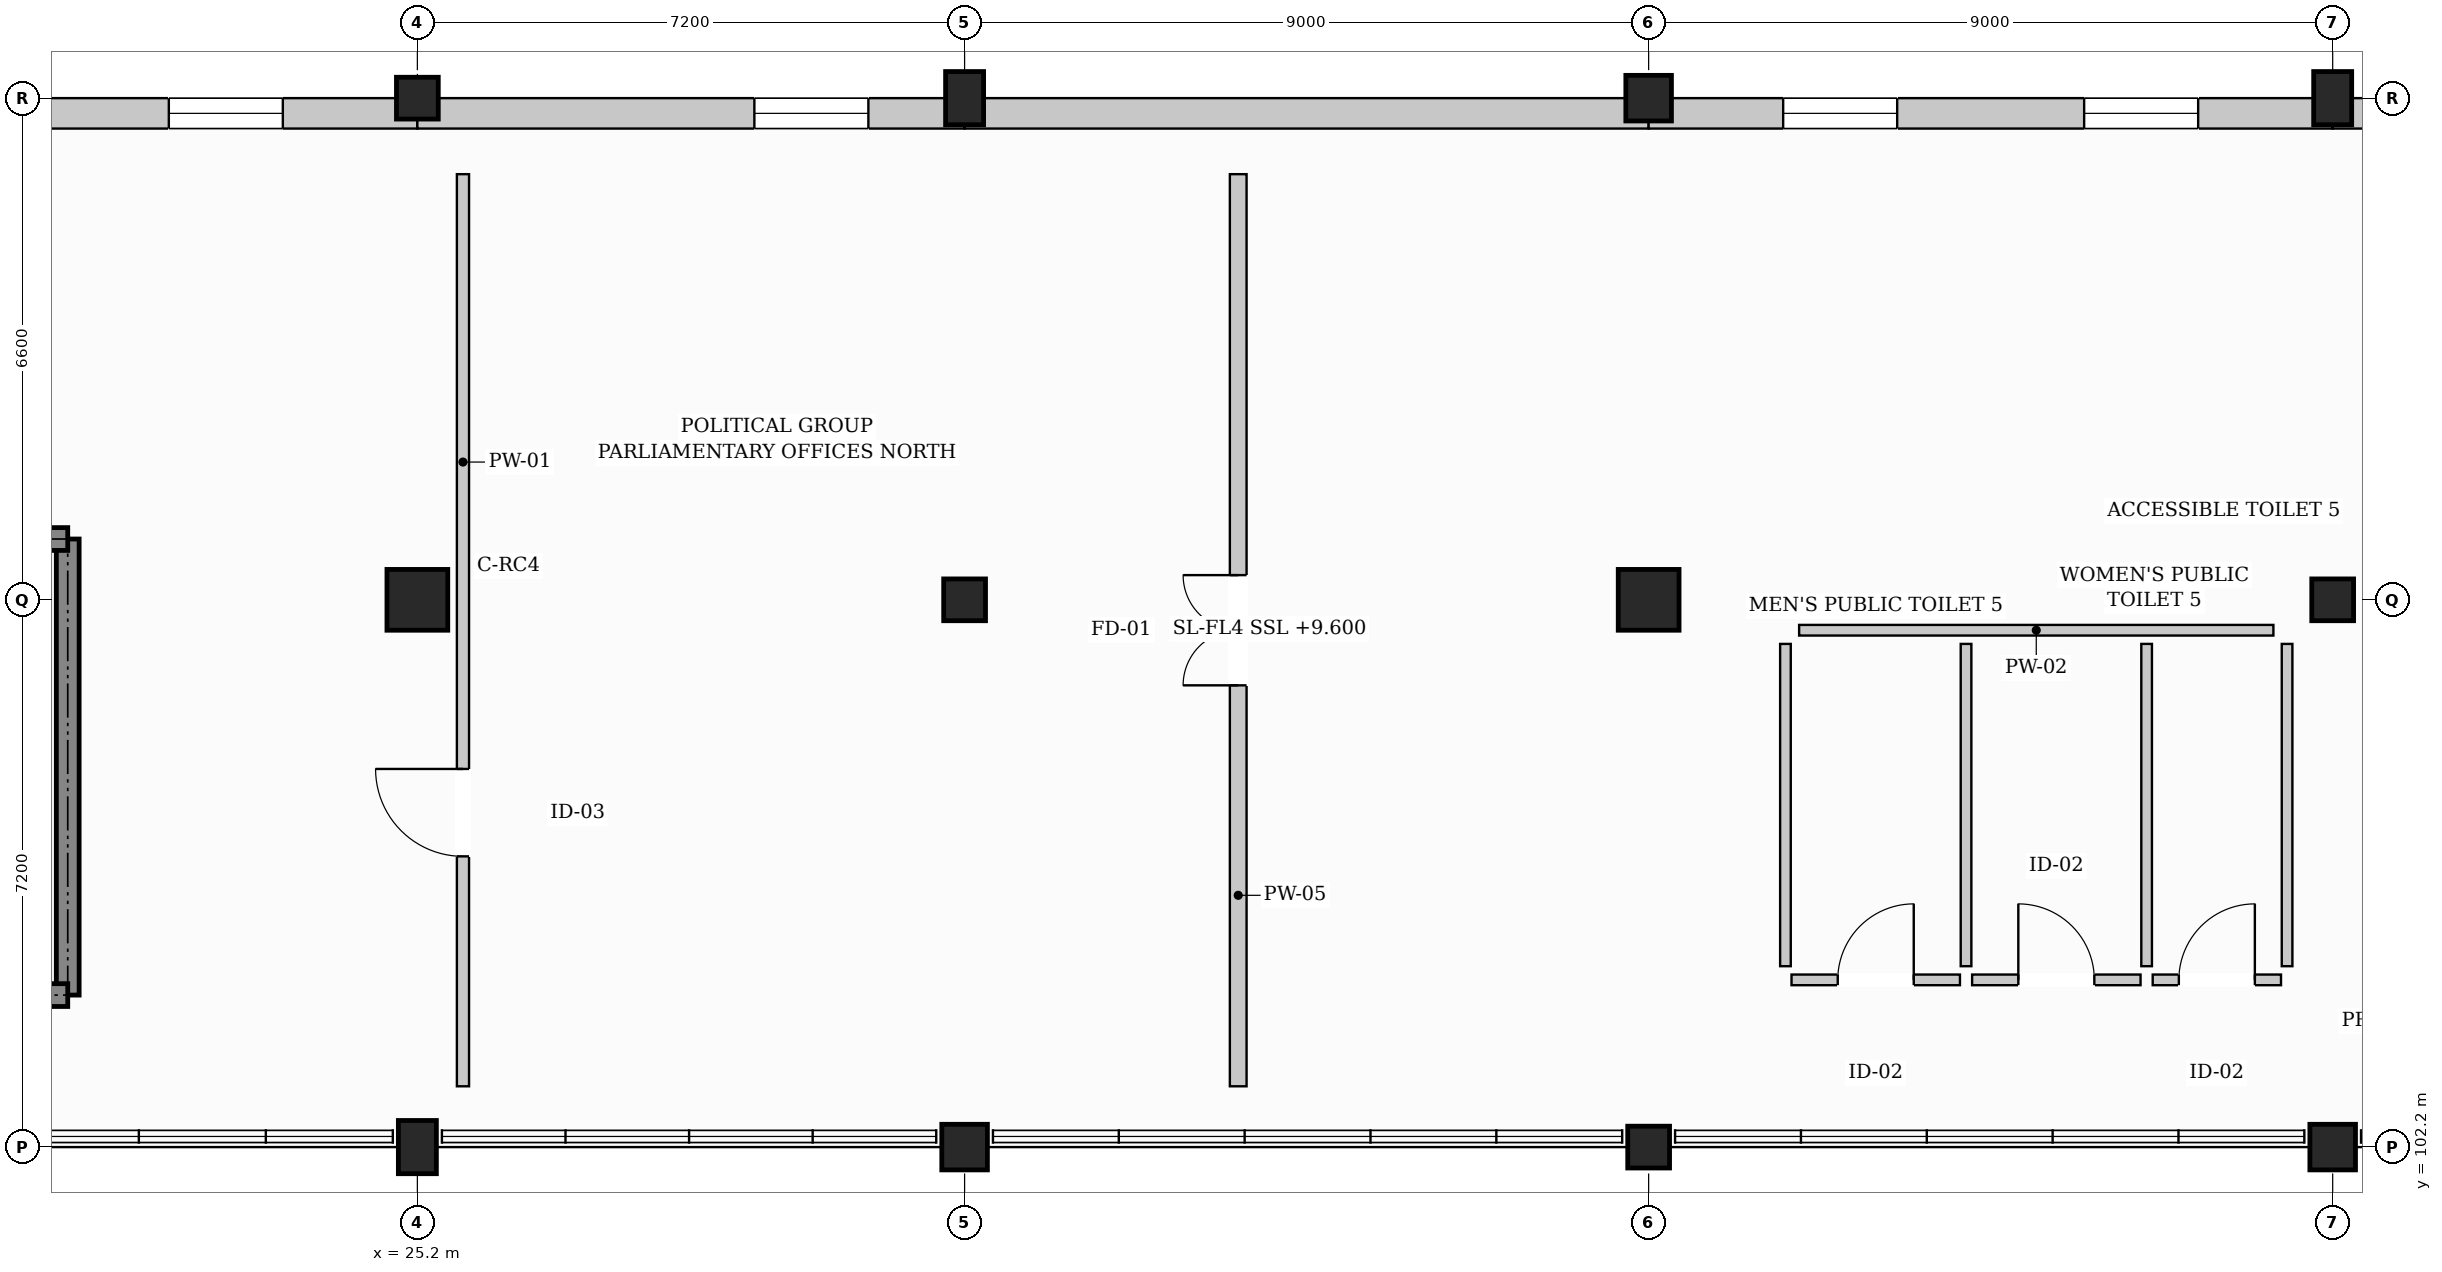
"""IFC4 building model, lengths in metres.
Left out: names, types, materials, properties, quantities, classifications, styles, units other than length and angle.
Written with IfcOpenShell. Run it as: python <this file> out.ifc"""

import sys

from ifc_helpers import new_model, si_unit, direction, frame, frame_2d, origin, origin_2d, place, context, subcontext, project, spatial, rectangle, extrude, element, fill, save


model = new_model("IFC4")
c1 = context("Model", 3, precision=1e-05, world=origin(), true_north=direction((0.0, 1.0)))
c2 = subcontext(c1, "Body", "Model", "MODEL_VIEW")
j1 = project(units=[si_unit("LENGTHUNIT", "METRE"), si_unit("PLANEANGLEUNIT", "RADIAN")], contexts=[c1])
p1 = place(None, origin())
s1 = spatial("IfcSite", under=j1, at=p1, CompositionType="ELEMENT")
p2 = place(p1, origin())
s2 = spatial("IfcBuilding", under=s1, at=p2, CompositionType="ELEMENT")
p3 = place(p2, frame((0.0, 0.0, 9.6)))
s3 = spatial("IfcBuildingStorey", under=s2, at=p3, CompositionType="ELEMENT", Elevation=9.6)
p4 = place(p3, frame((25.2, 102.2, 0.0), z_axis=(0.0, 0.0, 1.0), x_axis=(1.0, 0.0, 0.0)))
e1 = element("IfcColumn", 1, at=p4, inside=s3, PredefinedType="COLUMN", context=c2, shape_type="SweptSolid", body=[
    extrude(rectangle(XDim=0.5, YDim=0.7, at=origin_2d()), origin(), (0.0, 0.0, 1.0), 3.6),
])
p5 = place(p3, frame((25.2, 109.4, 0.0), z_axis=(0.0, 0.0, 1.0), x_axis=(1.0, 0.0, 0.0)))
e2 = element("IfcColumn", 2, at=p5, inside=s3, PredefinedType="COLUMN", context=c2, shape_type="SweptSolid", body=[
    extrude(rectangle(XDim=0.8, YDim=0.8, at=origin_2d()), origin(), (0.0, 0.0, 1.0), 3.6),
])
p6 = place(p3, frame((25.2, 116.0, 0.0), z_axis=(0.0, 0.0, 1.0), x_axis=(1.0, 0.0, 0.0)))
e3 = element("IfcColumn", 3, at=p6, inside=s3, PredefinedType="COLUMN", context=c2, shape_type="SweptSolid", body=[
    extrude(rectangle(XDim=0.55, YDim=0.55, at=origin_2d()), origin(), (0.0, 0.0, 1.0), 3.6),
])
p7 = place(p3, frame((32.4, 102.2, 0.0), z_axis=(0.0, 0.0, 1.0), x_axis=(1.0, 0.0, 0.0)))
e4 = element("IfcColumn", 4, at=p7, inside=s3, PredefinedType="COLUMN", context=c2, shape_type="SweptSolid", body=[
    extrude(rectangle(XDim=0.6, YDim=0.6, at=origin_2d()), origin(), (0.0, 0.0, 1.0), 3.6),
])
p8 = place(p3, frame((32.4, 109.4, 0.0), z_axis=(0.0, 0.0, 1.0), x_axis=(1.0, 0.0, 0.0)))
e5 = element("IfcColumn", 5, at=p8, inside=s3, PredefinedType="COLUMN", context=c2, shape_type="SweptSolid", body=[
    extrude(rectangle(XDim=0.55, YDim=0.55, at=origin_2d()), origin(), (0.0, 0.0, 1.0), 3.6),
])
p9 = place(p3, frame((32.4, 116.0, 0.0), z_axis=(0.0, 0.0, 1.0), x_axis=(1.0, 0.0, 0.0)))
e6 = element("IfcColumn", 6, at=p9, inside=s3, PredefinedType="COLUMN", context=c2, shape_type="SweptSolid", body=[
    extrude(rectangle(XDim=0.5, YDim=0.7, at=origin_2d()), origin(), (0.0, 0.0, 1.0), 3.6),
])
p10 = place(p3, frame((41.4, 102.2, 0.0), z_axis=(0.0, 0.0, 1.0), x_axis=(1.0, 0.0, 0.0)))
e7 = element("IfcColumn", 7, at=p10, inside=s3, PredefinedType="COLUMN", context=c2, shape_type="SweptSolid", body=[
    extrude(rectangle(XDim=0.55, YDim=0.55, at=origin_2d()), origin(), (0.0, 0.0, 1.0), 3.6),
])
p11 = place(p3, frame((41.4, 109.4, 0.0), z_axis=(0.0, 0.0, 1.0), x_axis=(1.0, 0.0, 0.0)))
e8 = element("IfcColumn", 8, at=p11, inside=s3, PredefinedType="COLUMN", context=c2, shape_type="SweptSolid", body=[
    extrude(rectangle(XDim=0.8, YDim=0.8, at=origin_2d()), origin(), (0.0, 0.0, 1.0), 3.6),
])
for number, where, z_axis, x_axis in (
    (9, (41.4, 116.0, 0.0), (0.0, 0.0, 1.0), (1.0, 0.0, 0.0)),
    (10, (50.4, 102.2, 0.0), (0.0, 0.0, 1.0), (1.0, 0.0, 0.0)),
):
    element("IfcColumn", number, at=place(p3, frame(where, z_axis=z_axis, x_axis=x_axis)), inside=s3, PredefinedType="COLUMN", context=c2, shape_type="SweptSolid", body=[
        extrude(rectangle(XDim=0.6, YDim=0.6, at=origin_2d()), origin(), (0.0, 0.0, 1.0), 3.6),
    ])
p12 = place(p3, frame((50.4, 109.4, 0.0), z_axis=(0.0, 0.0, 1.0), x_axis=(1.0, 0.0, 0.0)))
e11 = element("IfcColumn", 11, at=p12, inside=s3, PredefinedType="COLUMN", context=c2, shape_type="SweptSolid", body=[
    extrude(rectangle(XDim=0.55, YDim=0.55, at=origin_2d()), origin(), (0.0, 0.0, 1.0), 3.6),
])
p13 = place(p3, frame((50.4, 116.0, 0.0), z_axis=(0.0, 0.0, 1.0), x_axis=(1.0, 0.0, 0.0)))
e12 = element("IfcColumn", 12, at=p13, inside=s3, PredefinedType="COLUMN", context=c2, shape_type="SweptSolid", body=[
    extrude(rectangle(XDim=0.5, YDim=0.7, at=origin_2d()), origin(), (0.0, 0.0, 1.0), 3.6),
])
p14 = place(p3, frame((16.2, 115.8, 0.0), z_axis=(0.0, 0.0, 1.0), x_axis=(1.0, 0.0, 0.0)))
e13 = element("IfcWall", 13, at=p14, inside=s3, PredefinedType="SOLIDWALL", context=c2, shape_type="SweptSolid", body=[
    extrude(rectangle(XDim=9.0, YDim=0.4, at=frame_2d((4.5, 0.0))), origin(), (0.0, 0.0, 1.0), 2.6),
])
p15 = place(p14, frame((1.77, 0.0, 0.75)))
e14 = element("IfcOpeningElement", 14, at=p15, cuts=e13, PredefinedType="OPENING", context=c2, shape_type="SweptSolid", body=[
    extrude(rectangle(XDim=1.5, YDim=1.6, at=frame_2d((0.75, 0.8))), frame((0.0, 0.21, 0.0), z_axis=(0.0, -1.0, 0.0), x_axis=(1.0, 0.0, 0.0)), (0.0, 0.0, 1.0), 0.42),
])
p16 = place(p14, frame((5.73, 0.0, 0.75)))
e15 = element("IfcOpeningElement", 15, at=p16, cuts=e13, PredefinedType="OPENING", context=c2, shape_type="SweptSolid", body=[
    extrude(rectangle(XDim=1.5, YDim=1.6, at=frame_2d((0.75, 0.8))), frame((0.0, 0.21, 0.0), z_axis=(0.0, -1.0, 0.0), x_axis=(1.0, 0.0, 0.0)), (0.0, 0.0, 1.0), 0.42),
])
p17 = place(p3, frame((25.2, 115.8, 0.0), z_axis=(0.0, 0.0, 1.0), x_axis=(1.0, 0.0, 0.0)))
e16 = element("IfcWall", 16, at=p17, inside=s3, PredefinedType="SOLIDWALL", context=c2, shape_type="SweptSolid", body=[
    extrude(rectangle(XDim=7.2, YDim=0.4, at=frame_2d((3.6, 0.0))), origin(), (0.0, 0.0, 1.0), 2.6),
])
p18 = place(p17, frame((4.434, 0.0, 0.75)))
e17 = element("IfcOpeningElement", 17, at=p18, cuts=e16, PredefinedType="OPENING", context=c2, shape_type="SweptSolid", body=[
    extrude(rectangle(XDim=1.5, YDim=1.6, at=frame_2d((0.75, 0.8))), frame((0.0, 0.21, 0.0), z_axis=(0.0, -1.0, 0.0), x_axis=(1.0, 0.0, 0.0)), (0.0, 0.0, 1.0), 0.42),
])
p19 = place(p3, frame((32.4, 115.8, 0.0), z_axis=(0.0, 0.0, 1.0), x_axis=(1.0, 0.0, 0.0)))
e18 = element("IfcWall", 18, at=p19, inside=s3, PredefinedType="SOLIDWALL", context=c2, shape_type="SweptSolid", body=[
    extrude(rectangle(XDim=9.0, YDim=0.4, at=frame_2d((4.5, 0.0))), origin(), (0.0, 0.0, 1.0), 2.6),
])
p20 = place(p3, frame((41.4, 115.8, 0.0), z_axis=(0.0, 0.0, 1.0), x_axis=(1.0, 0.0, 0.0)))
e19 = element("IfcWall", 19, at=p20, inside=s3, PredefinedType="SOLIDWALL", context=c2, shape_type="SweptSolid", body=[
    extrude(rectangle(XDim=9.0, YDim=0.4, at=frame_2d((4.5, 0.0))), origin(), (0.0, 0.0, 1.0), 2.64),
])
p21 = place(p20, frame((1.77, 0.0, 0.75)))
e20 = element("IfcOpeningElement", 20, at=p21, cuts=e19, PredefinedType="OPENING", context=c2, shape_type="SweptSolid", body=[
    extrude(rectangle(XDim=1.5, YDim=1.6, at=frame_2d((0.75, 0.8))), frame((0.0, 0.21, 0.0), z_axis=(0.0, -1.0, 0.0), x_axis=(1.0, 0.0, 0.0)), (0.0, 0.0, 1.0), 0.42),
])
p22 = place(p20, frame((5.73, 0.0, 0.75)))
e21 = element("IfcOpeningElement", 21, at=p22, cuts=e19, PredefinedType="OPENING", context=c2, shape_type="SweptSolid", body=[
    extrude(rectangle(XDim=1.5, YDim=1.6, at=frame_2d((0.75, 0.8))), frame((0.0, 0.21, 0.0), z_axis=(0.0, -1.0, 0.0), x_axis=(1.0, 0.0, 0.0)), (0.0, 0.0, 1.0), 0.42),
])
p23 = place(p3, frame((50.4, 115.8, 0.0), z_axis=(0.0, 0.0, 1.0), x_axis=(1.0, 0.0, 0.0)))
e22 = element("IfcWall", 22, at=p23, inside=s3, PredefinedType="SOLIDWALL", context=c2, shape_type="SweptSolid", body=[
    extrude(rectangle(XDim=7.2, YDim=0.4, at=frame_2d((3.6, 0.0))), origin(), (0.0, 0.0, 1.0), 2.6),
])
p24 = place(p23, frame((1.266, 0.0, 0.75)))
e23 = element("IfcOpeningElement", 23, at=p24, cuts=e22, PredefinedType="OPENING", context=c2, shape_type="SweptSolid", body=[
    extrude(rectangle(XDim=1.5, YDim=1.6, at=frame_2d((0.75, 0.8))), frame((0.0, 0.21, 0.0), z_axis=(0.0, -1.0, 0.0), x_axis=(1.0, 0.0, 0.0)), (0.0, 0.0, 1.0), 0.42),
])
p25 = place(p23, frame((4.434, 0.0, 0.75)))
e24 = element("IfcOpeningElement", 24, at=p25, cuts=e22, PredefinedType="OPENING", context=c2, shape_type="SweptSolid", body=[
    extrude(rectangle(XDim=1.5, YDim=1.6, at=frame_2d((0.75, 0.8))), frame((0.0, 0.21, 0.0), z_axis=(0.0, -1.0, 0.0), x_axis=(1.0, 0.0, 0.0)), (0.0, 0.0, 1.0), 0.42),
])
p26 = place(p3, frame((20.6, 104.2, 0.0), z_axis=(0.0, 0.0, 1.0), x_axis=(0.0, 1.0, 0.0)))
e25 = element("IfcWall", 25, at=p26, inside=s3, PredefinedType="SHEAR", context=c2, shape_type="SweptSolid", body=[
    extrude(rectangle(XDim=6.0, YDim=0.3, at=frame_2d((3.0, 0.0))), origin(), (0.0, 0.0, 1.0), 3.32),
])
for number, where, z_axis, x_axis in (
    (26, (13.6, 104.2, 0.0), (0.0, 0.0, 1.0), (1.0, 0.0, 0.0)),
    (27, (13.6, 110.2, 0.0), (0.0, 0.0, 1.0), (1.0, 0.0, 0.0)),
):
    element("IfcWall", number, at=place(p3, frame(where, z_axis=z_axis, x_axis=x_axis)), inside=s3, PredefinedType="SHEAR", context=c2, shape_type="SweptSolid", body=[
        extrude(rectangle(XDim=7.0, YDim=0.3, at=frame_2d((3.5, 0.0))), origin(), (0.0, 0.0, 1.0), 3.32),
    ])
p27 = place(p3, frame((43.38, 109.0, 0.0), z_axis=(0.0, 0.0, 1.0), x_axis=(1.0, 0.0, 0.0)))
e28 = element("IfcWall", 28, at=p27, inside=s3, PredefinedType="PARTITIONING", context=c2, shape_type="SweptSolid", body=[
    extrude(rectangle(XDim=6.24, YDim=0.14, at=frame_2d((3.12, 0.0))), origin(), (0.0, 0.0, 1.0), 3.1),
])
for number, where, z_axis, x_axis in (
    (29, (43.2, 104.58, 0.0), (0.0, 0.0, 1.0), (0.0, 1.0, 0.0)),
    (30, (49.8, 104.58, 0.0), (0.0, 0.0, 1.0), (0.0, 1.0, 0.0)),
    (31, (45.576, 104.58, 0.0), (0.0, 0.0, 1.0), (0.0, 1.0, 0.0)),
    (32, (47.952, 104.58, 0.0), (0.0, 0.0, 1.0), (0.0, 1.0, 0.0)),
):
    element("IfcWall", number, at=place(p3, frame(where, z_axis=z_axis, x_axis=x_axis)), inside=s3, PredefinedType="PARTITIONING", context=c2, shape_type="SweptSolid", body=[
        extrude(rectangle(XDim=4.24, YDim=0.14, at=frame_2d((2.12, 0.0))), origin(), (0.0, 0.0, 1.0), 3.32),
    ])
p28 = place(p3, frame((43.28, 104.4, 0.0), z_axis=(0.0, 0.0, 1.0), x_axis=(1.0, 0.0, 0.0)))
e33 = element("IfcWall", 33, at=p28, inside=s3, PredefinedType="PARTITIONING", context=c2, shape_type="SweptSolid", body=[
    extrude(rectangle(XDim=2.216, YDim=0.14, at=frame_2d((1.108, 0.0))), origin(), (0.0, 0.0, 1.0), 3.32),
])
p29 = place(p28, frame((0.608, 0.0, 0.0)))
e34 = element("IfcOpeningElement", 34, at=p29, cuts=e33, PredefinedType="OPENING", context=c2, shape_type="SweptSolid", body=[
    extrude(rectangle(XDim=1.0, YDim=2.15, at=frame_2d((0.5, 1.075))), frame((0.0, 0.08, 0.0), z_axis=(0.0, -1.0, 0.0), x_axis=(1.0, 0.0, 0.0)), (0.0, 0.0, 1.0), 0.16),
])
p30 = place(p3, frame((45.656, 104.4, 0.0), z_axis=(0.0, 0.0, 1.0), x_axis=(1.0, 0.0, 0.0)))
e35 = element("IfcWall", 35, at=p30, inside=s3, PredefinedType="PARTITIONING", context=c2, shape_type="SweptSolid", body=[
    extrude(rectangle(XDim=2.216, YDim=0.14, at=frame_2d((1.108, 0.0))), origin(), (0.0, 0.0, 1.0), 3.1),
])
p31 = place(p30, frame((0.608, 0.0, 0.0)))
e36 = element("IfcOpeningElement", 36, at=p31, cuts=e35, PredefinedType="OPENING", context=c2, shape_type="SweptSolid", body=[
    extrude(rectangle(XDim=1.0, YDim=2.15, at=frame_2d((0.5, 1.075))), frame((0.0, 0.08, 0.0), z_axis=(0.0, -1.0, 0.0), x_axis=(1.0, 0.0, 0.0)), (0.0, 0.0, 1.0), 0.16),
])
p32 = place(p3, frame((48.032, 104.4, 0.0), z_axis=(0.0, 0.0, 1.0), x_axis=(1.0, 0.0, 0.0)))
e37 = element("IfcWall", 37, at=p32, inside=s3, PredefinedType="PARTITIONING", context=c2, shape_type="SweptSolid", body=[
    extrude(rectangle(XDim=1.688, YDim=0.14, at=frame_2d((0.844, 0.0))), origin(), (0.0, 0.0, 1.0), 3.32),
])
p33 = place(p32, frame((0.344, 0.0, 0.0)))
e38 = element("IfcOpeningElement", 38, at=p33, cuts=e37, PredefinedType="OPENING", context=c2, shape_type="SweptSolid", body=[
    extrude(rectangle(XDim=1.0, YDim=2.15, at=frame_2d((0.5, 1.075))), frame((0.0, 0.08, 0.0), z_axis=(0.0, -1.0, 0.0), x_axis=(1.0, 0.0, 0.0)), (0.0, 0.0, 1.0), 0.16),
])
p34 = place(p3, frame((36.0, 103.0, 0.0), z_axis=(0.0, 0.0, 1.0), x_axis=(0.0, 1.0, 0.0)))
e39 = element("IfcWall", 39, at=p34, inside=s3, PredefinedType="PARTITIONING", context=c2, shape_type="SweptSolid", body=[
    extrude(rectangle(XDim=12.0, YDim=0.22, at=frame_2d((6.0, 0.0))), origin(), (0.0, 0.0, 1.0), 2.62),
])
p35 = place(p34, frame((5.275, 0.0, 0.0)))
e40 = element("IfcOpeningElement", 40, at=p35, cuts=e39, PredefinedType="OPENING", context=c2, shape_type="SweptSolid", body=[
    extrude(rectangle(XDim=1.45, YDim=2.2, at=frame_2d((0.725, 1.1))), frame((0.0, 0.12, 0.0), z_axis=(0.0, -1.0, 0.0), x_axis=(1.0, 0.0, 0.0)), (0.0, 0.0, 1.0), 0.24),
])
p36 = place(p3, frame((25.8, 103.0, 0.0), z_axis=(0.0, 0.0, 1.0), x_axis=(0.0, 1.0, 0.0)))
e41 = element("IfcWall", 41, at=p36, inside=s3, PredefinedType="PARTITIONING", context=c2, shape_type="SweptSolid", body=[
    extrude(rectangle(XDim=12.0, YDim=0.16, at=frame_2d((6.0, 0.0))), origin(), (0.0, 0.0, 1.0), 2.82),
])
p37 = place(p36, frame((3.025, 0.0, 0.0)))
e42 = element("IfcOpeningElement", 42, at=p37, cuts=e41, PredefinedType="OPENING", context=c2, shape_type="SweptSolid", body=[
    extrude(rectangle(XDim=1.15, YDim=2.2, at=frame_2d((0.575, 1.1))), frame((0.0, 0.09, 0.0), z_axis=(0.0, -1.0, 0.0), x_axis=(1.0, 0.0, 0.0)), (0.0, 0.0, 1.0), 0.18),
])
p38 = place(p16, origin())
e43 = element("IfcWindow", 43, at=p38, inside=s3, PartitioningType="DOUBLE_PANEL_HORIZONTAL", PredefinedType="WINDOW", context=c2, shape_type="SweptSolid", body=[
    extrude(rectangle(XDim=1.5, YDim=1.6, at=frame_2d((0.75, 0.8))), frame((0.0, 0.03, 0.0), z_axis=(0.0, -1.0, 0.0), x_axis=(1.0, 0.0, 0.0)), (0.0, 0.0, 1.0), 0.06),
])
fill(e15, e43)
p39 = place(p18, origin())
e44 = element("IfcWindow", 44, at=p39, inside=s3, PartitioningType="DOUBLE_PANEL_HORIZONTAL", PredefinedType="WINDOW", context=c2, shape_type="SweptSolid", body=[
    extrude(rectangle(XDim=1.5, YDim=1.6, at=frame_2d((0.75, 0.8))), frame((0.0, 0.03, 0.0), z_axis=(0.0, -1.0, 0.0), x_axis=(1.0, 0.0, 0.0)), (0.0, 0.0, 1.0), 0.06),
])
fill(e17, e44)
p40 = place(p21, origin())
e45 = element("IfcWindow", 45, at=p40, inside=s3, PartitioningType="DOUBLE_PANEL_HORIZONTAL", PredefinedType="WINDOW", context=c2, shape_type="SweptSolid", body=[
    extrude(rectangle(XDim=1.5, YDim=1.6, at=frame_2d((0.75, 0.8))), frame((0.0, 0.03, 0.0), z_axis=(0.0, -1.0, 0.0), x_axis=(1.0, 0.0, 0.0)), (0.0, 0.0, 1.0), 0.06),
])
fill(e20, e45)
p41 = place(p22, origin())
e46 = element("IfcWindow", 46, at=p41, inside=s3, PartitioningType="DOUBLE_PANEL_HORIZONTAL", PredefinedType="WINDOW", context=c2, shape_type="SweptSolid", body=[
    extrude(rectangle(XDim=1.5, YDim=1.6, at=frame_2d((0.75, 0.8))), frame((0.0, 0.03, 0.0), z_axis=(0.0, -1.0, 0.0), x_axis=(1.0, 0.0, 0.0)), (0.0, 0.0, 1.0), 0.06),
])
fill(e21, e46)
p42 = place(p29, origin())
e47 = element("IfcDoor", 47, at=p42, inside=s3, OperationType="SINGLE_SWING_RIGHT", PredefinedType="DOOR", context=c2, shape_type="SweptSolid", body=[
    extrude(rectangle(XDim=1.0, YDim=2.15, at=frame_2d((0.5, 1.075))), frame((0.0, 0.025, 0.0), z_axis=(0.0, -1.0, 0.0), x_axis=(1.0, 0.0, 0.0)), (0.0, 0.0, 1.0), 0.05),
])
fill(e34, e47)
p43 = place(p31, origin())
e48 = element("IfcDoor", 48, at=p43, inside=s3, OperationType="SINGLE_SWING_LEFT", PredefinedType="DOOR", context=c2, shape_type="SweptSolid", body=[
    extrude(rectangle(XDim=1.0, YDim=2.15, at=frame_2d((0.5, 1.075))), frame((0.0, 0.025, 0.0), z_axis=(0.0, -1.0, 0.0), x_axis=(1.0, 0.0, 0.0)), (0.0, 0.0, 1.0), 0.05),
])
fill(e36, e48)
p44 = place(p33, origin())
e49 = element("IfcDoor", 49, at=p44, inside=s3, OperationType="SINGLE_SWING_RIGHT", PredefinedType="DOOR", context=c2, shape_type="SweptSolid", body=[
    extrude(rectangle(XDim=1.0, YDim=2.15, at=frame_2d((0.5, 1.075))), frame((0.0, 0.025, 0.0), z_axis=(0.0, -1.0, 0.0), x_axis=(1.0, 0.0, 0.0)), (0.0, 0.0, 1.0), 0.05),
])
fill(e38, e49)
p45 = place(p35, origin())
e50 = element("IfcDoor", 50, at=p45, inside=s3, OperationType="DOUBLE_DOOR_SINGLE_SWING", PredefinedType="DOOR", context=c2, shape_type="SweptSolid", body=[
    extrude(rectangle(XDim=1.45, YDim=2.2, at=frame_2d((0.725, 1.1))), frame((0.0, 0.025, 0.0), z_axis=(0.0, -1.0, 0.0), x_axis=(1.0, 0.0, 0.0)), (0.0, 0.0, 1.0), 0.05),
])
fill(e40, e50)
p46 = place(p37, origin())
e51 = element("IfcDoor", 51, at=p46, inside=s3, OperationType="SINGLE_SWING_RIGHT", PredefinedType="DOOR", context=c2, shape_type="SweptSolid", body=[
    extrude(rectangle(XDim=1.15, YDim=2.2, at=frame_2d((0.575, 1.1))), frame((0.0, 0.025, 0.0), z_axis=(0.0, -1.0, 0.0), x_axis=(1.0, 0.0, 0.0)), (0.0, 0.0, 1.0), 0.05),
])
fill(e42, e51)
save(model, sys.argv[1])
